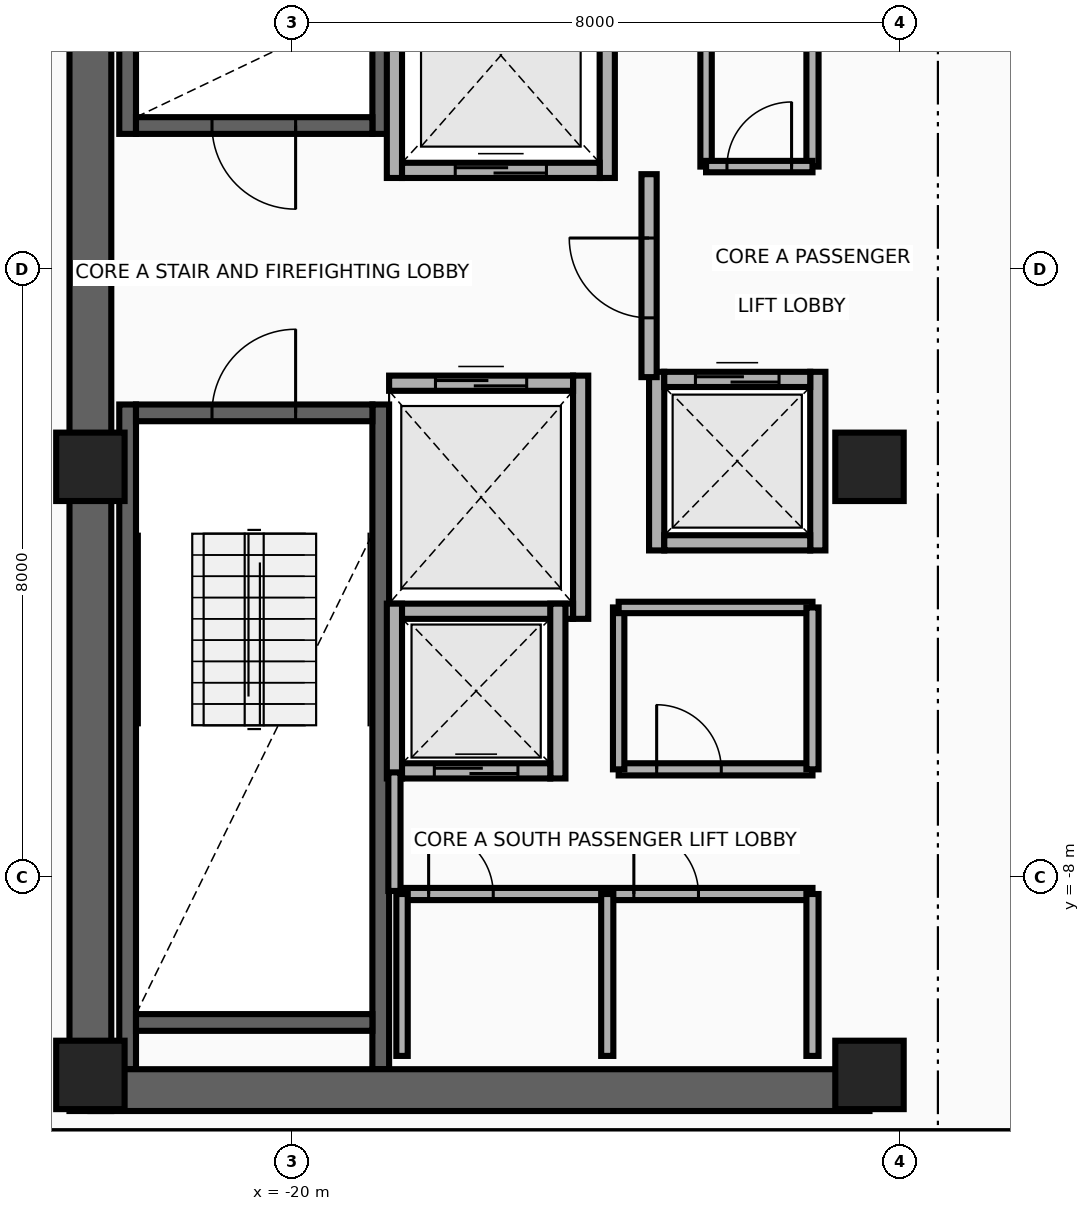
"""IFC4 building model, lengths in metres.
Left out: names, types, materials, properties, quantities, classifications, styles, units other than length and angle.
Written with IfcOpenShell. Run it as: python <this file> out.ifc"""

import sys

from ifc_helpers import new_model, si_unit, direction, frame, frame_2d, origin, origin_2d, place, context, subcontext, project, spatial, rectangle, extrude, source, transform, mapped, element, fill, save


model = new_model("IFC4")
c1 = context("Model", 3, precision=1e-05, world=origin(), true_north=direction((0.0, 1.0)))
c2 = subcontext(c1, "Body", "Model", "MODEL_VIEW")
j1 = project(units=[si_unit("LENGTHUNIT", "METRE"), si_unit("PLANEANGLEUNIT", "RADIAN")], contexts=[c1])
p1 = place(None, origin())
s1 = spatial("IfcSite", under=j1, at=p1, CompositionType="ELEMENT")
p2 = place(p1, origin())
s2 = spatial("IfcBuilding", under=s1, at=p2, CompositionType="ELEMENT")
p3 = place(p2, frame((0.0, 0.0, 237.0)))
s3 = spatial("IfcBuildingStorey", under=s2, at=p3, CompositionType="ELEMENT", Elevation=237.0)
for number, where, z_axis, x_axis in (
    (1, (-22.16, 1.78, 0.0), (0.0, 0.0, 1.0), (0.0, 1.0, 0.0)),
    (2, (-18.83, 1.78, 0.0), (0.0, 0.0, 1.0), (0.0, 1.0, 0.0)),
):
    element("IfcWall", number, at=place(p3, frame(where, z_axis=z_axis, x_axis=x_axis)), inside=s3, PredefinedType="SHEAR", context=c2, shape_type="SweptSolid", body=[
        extrude(rectangle(XDim=8.745, YDim=0.22, at=frame_2d((4.373, 0.0))), origin(), (0.0, 0.0, 1.0), 3.26),
    ])
p4 = place(p3, frame((-22.05, 1.89, 0.0), z_axis=(0.0, 0.0, 1.0), x_axis=(1.0, 0.0, 0.0)))
e3 = element("IfcWall", 3, at=p4, inside=s3, PredefinedType="SHEAR", context=c2, shape_type="SweptSolid", body=[
    extrude(rectangle(XDim=3.11, YDim=0.22, at=frame_2d((1.555, 0.0))), origin(), (0.0, 0.0, 1.0), 3.26),
])
p5 = place(p4, frame((1.0, 0.0, 0.0)))
e4 = element("IfcOpeningElement", 4, at=p5, cuts=e3, PredefinedType="OPENING", context=c2, shape_type="SweptSolid", body=[
    extrude(rectangle(XDim=1.1, YDim=2.15, at=frame_2d((0.55, 1.075))), frame((0.0, 0.125, 0.0), z_axis=(0.0, -1.0, 0.0), x_axis=(1.0, 0.0, 0.0)), (0.0, 0.0, 1.0), 0.25),
])
for number, where, z_axis, x_axis in (
    (5, (-22.16, -10.525, 0.0), (0.0, 0.0, 1.0), (0.0, 1.0, 0.0)),
    (6, (-18.83, -10.525, 0.0), (0.0, 0.0, 1.0), (0.0, 1.0, 0.0)),
):
    element("IfcWall", number, at=place(p3, frame(where, z_axis=z_axis, x_axis=x_axis)), inside=s3, PredefinedType="SHEAR", context=c2, shape_type="SweptSolid", body=[
        extrude(rectangle(XDim=8.745, YDim=0.22, at=frame_2d((4.373, 0.0))), origin(), (0.0, 0.0, 1.0), 3.26),
    ])
p6 = place(p3, frame((-22.05, -9.91, 0.0), z_axis=(0.0, 0.0, 1.0), x_axis=(1.0, 0.0, 0.0)))
e7 = element("IfcWall", 7, at=p6, inside=s3, PredefinedType="SHEAR", context=c2, shape_type="SweptSolid", body=[
    extrude(rectangle(XDim=3.11, YDim=0.22, at=frame_2d((1.555, 0.0))), origin(), (0.0, 0.0, 1.0), 3.26),
])
p7 = place(p3, frame((-22.05, -1.89, 0.0), z_axis=(0.0, 0.0, 1.0), x_axis=(1.0, 0.0, 0.0)))
e8 = element("IfcWall", 8, at=p7, inside=s3, PredefinedType="SHEAR", context=c2, shape_type="SweptSolid", body=[
    extrude(rectangle(XDim=3.11, YDim=0.22, at=frame_2d((1.555, 0.0))), origin(), (0.0, 0.0, 1.0), 3.26),
])
p8 = place(p7, frame((1.0, 0.0, 0.0)))
e9 = element("IfcOpeningElement", 9, at=p8, cuts=e8, PredefinedType="OPENING", context=c2, shape_type="SweptSolid", body=[
    extrude(rectangle(XDim=1.1, YDim=2.15, at=frame_2d((0.55, 1.075))), frame((0.0, 0.125, 0.0), z_axis=(0.0, -1.0, 0.0), x_axis=(1.0, 0.0, 0.0)), (0.0, 0.0, 1.0), 0.25),
])
p9 = place(p3, frame((-22.65, -11.075, 0.0), z_axis=(0.0, 0.0, 1.0), x_axis=(0.0, 1.0, 0.0)))
e10 = element("IfcWall", 10, at=p9, inside=s3, PredefinedType="SHEAR", context=c2, shape_type="SweptSolid", body=[
    extrude(rectangle(XDim=22.15, YDim=0.55, at=frame_2d((11.075, 0.0))), origin(), (0.0, 0.0, 1.0), 3.26),
])
p10 = place(p3, frame((-22.65, -10.8, 0.0), z_axis=(0.0, 0.0, 1.0), x_axis=(1.0, 0.0, 0.0)))
e11 = element("IfcWall", 11, at=p10, inside=s3, PredefinedType="SHEAR", context=c2, shape_type="SweptSolid", body=[
    extrude(rectangle(XDim=10.25, YDim=0.55, at=frame_2d((5.125, 0.0))), origin(), (0.0, 0.0, 1.0), 3.26),
])
m1 = source(origin(), c2, "Body", "SweptSolid", [
    extrude(rectangle(XDim=0.9, YDim=0.9, at=origin_2d()), origin(), (0.0, 0.0, 1.0), 3.5),
])
for number, where, z_axis, x_axis in (
    (12, (-22.65, -10.6, 0.0), (0.0, 0.0, 1.0), (1.0, 0.0, 0.0)),
    (13, (-12.4, -10.6, 0.0), (0.0, 0.0, 1.0), (1.0, 0.0, 0.0)),
    (14, (-22.65, -2.6, 0.0), (0.0, 0.0, 1.0), (1.0, 0.0, 0.0)),
    (15, (-12.4, -2.6, 0.0), (0.0, 0.0, 1.0), (1.0, 0.0, 0.0)),
):
    element("IfcColumn", number, at=place(p3, frame(where, z_axis=z_axis, x_axis=x_axis)), inside=s3, PredefinedType="COLUMN", context=c2, shape_type="MappedRepresentation", body=[
        mapped(m1, transform((0.0, 0.0, 0.0), x_axis=(1.0, 0.0, 0.0), y_axis=(0.0, 1.0, 0.0), z_axis=(0.0, 0.0, 1.0), scale=1.0)),
    ])
for number, where, z_axis, x_axis in (
    (16, (-18.65, 1.2, 0.0), (0.0, 0.0, 1.0), (0.0, 1.0, 0.0)),
    (17, (-15.85, 1.2, 0.0), (0.0, 0.0, 1.0), (0.0, 1.0, 0.0)),
):
    element("IfcWall", number, at=place(p3, frame(where, z_axis=z_axis, x_axis=x_axis)), inside=s3, PredefinedType="MOVABLE", context=c2, shape_type="SweptSolid", body=[
        extrude(rectangle(XDim=3.225, YDim=0.2, at=frame_2d((1.613, 0.0))), origin(), (0.0, 0.0, 1.0), 3.26),
    ])
p11 = place(p3, frame((-18.55, 1.3, 0.0), z_axis=(0.0, 0.0, 1.0), x_axis=(1.0, 0.0, 0.0)))
e18 = element("IfcWall", 18, at=p11, inside=s3, PredefinedType="MOVABLE", context=c2, shape_type="SweptSolid", body=[
    extrude(rectangle(XDim=2.6, YDim=0.2, at=frame_2d((1.3, 0.0))), origin(), (0.0, 0.0, 1.0), 3.26),
])
p12 = place(p11, frame((0.7, 0.0, 0.0)))
e19 = element("IfcOpeningElement", 19, at=p12, cuts=e18, PredefinedType="OPENING", context=c2, shape_type="SweptSolid", body=[
    extrude(rectangle(XDim=1.2, YDim=2.1, at=frame_2d((0.6, 1.05))), frame((0.0, 0.115, 0.0), z_axis=(0.0, -1.0, 0.0), x_axis=(1.0, 0.0, 0.0)), (0.0, 0.0, 1.0), 0.23),
])
p13 = place(p3, frame((-16.2, -4.6, 0.0), z_axis=(0.0, 0.0, 1.0), x_axis=(0.0, 1.0, 0.0)))
e20 = element("IfcWall", 20, at=p13, inside=s3, PredefinedType="MOVABLE", context=c2, shape_type="SweptSolid", body=[
    extrude(rectangle(XDim=3.2, YDim=0.2, at=frame_2d((1.6, 0.0))), origin(), (0.0, 0.0, 1.0), 3.26),
])
p14 = place(p3, frame((-18.72, -4.5, 0.0), z_axis=(0.0, 0.0, 1.0), x_axis=(1.0, 0.0, 0.0)))
e21 = element("IfcWall", 21, at=p14, inside=s3, PredefinedType="MOVABLE", context=c2, shape_type="SweptSolid", body=[
    extrude(rectangle(XDim=2.42, YDim=0.2, at=frame_2d((1.21, 0.0))), origin(), (0.0, 0.0, 1.0), 3.26),
])
p15 = place(p3, frame((-18.72, -1.5, 0.0), z_axis=(0.0, 0.0, 1.0), x_axis=(1.0, 0.0, 0.0)))
e22 = element("IfcWall", 22, at=p15, inside=s3, PredefinedType="MOVABLE", context=c2, shape_type="SweptSolid", body=[
    extrude(rectangle(XDim=2.42, YDim=0.2, at=frame_2d((1.21, 0.0))), origin(), (0.0, 0.0, 1.0), 3.26),
])
p16 = place(p15, frame((0.61, 0.0, 0.0)))
e23 = element("IfcOpeningElement", 23, at=p16, cuts=e22, PredefinedType="OPENING", context=c2, shape_type="SweptSolid", body=[
    extrude(rectangle(XDim=1.2, YDim=2.1, at=frame_2d((0.6, 1.05))), frame((0.0, 0.115, 0.0), z_axis=(0.0, -1.0, 0.0), x_axis=(1.0, 0.0, 0.0)), (0.0, 0.0, 1.0), 0.23),
])
for number, where, z_axis, x_axis in (
    (24, (-18.65, -6.7, 0.0), (0.0, 0.0, 1.0), (0.0, 1.0, 0.0)),
    (25, (-16.5, -6.7, 0.0), (0.0, 0.0, 1.0), (0.0, 1.0, 0.0)),
):
    element("IfcWall", number, at=place(p3, frame(where, z_axis=z_axis, x_axis=x_axis)), inside=s3, PredefinedType="MOVABLE", context=c2, shape_type="SweptSolid", body=[
        extrude(rectangle(XDim=2.3, YDim=0.2, at=frame_2d((1.15, 0.0))), origin(), (0.0, 0.0, 1.0), 3.26),
    ])
p17 = place(p3, frame((-18.55, -6.6, 0.0), z_axis=(0.0, 0.0, 1.0), x_axis=(1.0, 0.0, 0.0)))
e26 = element("IfcWall", 26, at=p17, inside=s3, PredefinedType="MOVABLE", context=c2, shape_type="SweptSolid", body=[
    extrude(rectangle(XDim=1.95, YDim=0.2, at=frame_2d((0.975, 0.0))), origin(), (0.0, 0.0, 1.0), 3.26),
])
p18 = place(p17, frame((0.425, 0.0, 0.0)))
e27 = element("IfcOpeningElement", 27, at=p18, cuts=e26, PredefinedType="OPENING", context=c2, shape_type="SweptSolid", body=[
    extrude(rectangle(XDim=1.1, YDim=2.1, at=frame_2d((0.55, 1.05))), frame((0.0, 0.115, 0.0), z_axis=(0.0, -1.0, 0.0), x_axis=(1.0, 0.0, 0.0)), (0.0, 0.0, 1.0), 0.23),
])
for number, where, z_axis, x_axis in (
    (28, (-15.2, -3.7, 0.0), (0.0, 0.0, 1.0), (0.0, 1.0, 0.0)),
    (29, (-13.08, -3.7, 0.0), (0.0, 0.0, 1.0), (0.0, 1.0, 0.0)),
):
    element("IfcWall", number, at=place(p3, frame(where, z_axis=z_axis, x_axis=x_axis)), inside=s3, PredefinedType="MOVABLE", context=c2, shape_type="SweptSolid", body=[
        extrude(rectangle(XDim=2.35, YDim=0.2, at=frame_2d((1.175, 0.0))), origin(), (0.0, 0.0, 1.0), 3.26),
    ])
p19 = place(p3, frame((-15.1, -3.6, 0.0), z_axis=(0.0, 0.0, 1.0), x_axis=(1.0, 0.0, 0.0)))
e30 = element("IfcWall", 30, at=p19, inside=s3, PredefinedType="MOVABLE", context=c2, shape_type="SweptSolid", body=[
    extrude(rectangle(XDim=1.92, YDim=0.2, at=frame_2d((0.96, 0.0))), origin(), (0.0, 0.0, 1.0), 3.26),
])
p20 = place(p3, frame((-15.1, -1.45, 0.0), z_axis=(0.0, 0.0, 1.0), x_axis=(1.0, 0.0, 0.0)))
e31 = element("IfcWall", 31, at=p20, inside=s3, PredefinedType="MOVABLE", context=c2, shape_type="SweptSolid", body=[
    extrude(rectangle(XDim=1.92, YDim=0.2, at=frame_2d((0.96, 0.0))), origin(), (0.0, 0.0, 1.0), 3.26),
])
p21 = place(p20, frame((0.41, 0.0, 0.0)))
e32 = element("IfcOpeningElement", 32, at=p21, cuts=e31, PredefinedType="OPENING", context=c2, shape_type="SweptSolid", body=[
    extrude(rectangle(XDim=1.1, YDim=2.1, at=frame_2d((0.55, 1.05))), frame((0.0, 0.115, 0.0), z_axis=(0.0, -1.0, 0.0), x_axis=(1.0, 0.0, 0.0)), (0.0, 0.0, 1.0), 0.23),
])
p22 = place(p3, frame((-15.3, -1.42, 0.0), z_axis=(0.0, 0.0, 1.0), x_axis=(0.0, 1.0, 0.0)))
e33 = element("IfcWall", 33, at=p22, inside=s3, PredefinedType="PARTITIONING", context=c2, shape_type="SweptSolid", body=[
    extrude(rectangle(XDim=2.67, YDim=0.2, at=frame_2d((1.335, 0.0))), origin(), (0.0, 0.0, 1.0), 3.26),
])
p23 = place(p22, frame((0.78, 0.0, 0.0)))
e34 = element("IfcOpeningElement", 34, at=p23, cuts=e33, PredefinedType="OPENING", context=c2, shape_type="SweptSolid", body=[
    extrude(rectangle(XDim=1.05, YDim=2.15, at=frame_2d((0.525, 1.075))), frame((0.0, 0.115, 0.0), z_axis=(0.0, -1.0, 0.0), x_axis=(1.0, 0.0, 0.0)), (0.0, 0.0, 1.0), 0.23),
])
p24 = place(p3, frame((-18.65, -8.18, 0.0), z_axis=(0.0, 0.0, 1.0), x_axis=(0.0, 1.0, 0.0)))
e35 = element("IfcWall", 35, at=p24, inside=s3, PredefinedType="PARTITIONING", context=c2, shape_type="SweptSolid", body=[
    extrude(rectangle(XDim=1.56, YDim=0.16, at=frame_2d((0.78, 0.0))), origin(), (0.0, 0.0, 1.0), 3.26),
])
p25 = place(p3, frame((-18.55, -8.22, 0.0), z_axis=(0.0, 0.0, 1.0), x_axis=(1.0, 0.0, 0.0)))
e36 = element("IfcWall", 36, at=p25, inside=s3, PredefinedType="PARTITIONING", context=c2, shape_type="SweptSolid", body=[
    extrude(rectangle(XDim=5.4, YDim=0.16, at=frame_2d((2.7, 0.0))), origin(), (0.0, 0.0, 1.0), 3.26),
])
p26 = place(p25, frame((0.35, 0.0, 0.0)))
e37 = element("IfcOpeningElement", 37, at=p26, cuts=e36, PredefinedType="OPENING", context=c2, shape_type="SweptSolid", body=[
    extrude(rectangle(XDim=0.85, YDim=2.05, at=frame_2d((0.425, 1.025))), frame((0.0, 0.095, 0.0), z_axis=(0.0, -1.0, 0.0), x_axis=(1.0, 0.0, 0.0)), (0.0, 0.0, 1.0), 0.19),
])
p27 = place(p25, frame((3.05, 0.0, 0.0)))
e38 = element("IfcOpeningElement", 38, at=p27, cuts=e36, PredefinedType="OPENING", context=c2, shape_type="SweptSolid", body=[
    extrude(rectangle(XDim=0.85, YDim=2.05, at=frame_2d((0.425, 1.025))), frame((0.0, 0.095, 0.0), z_axis=(0.0, -1.0, 0.0), x_axis=(1.0, 0.0, 0.0)), (0.0, 0.0, 1.0), 0.19),
])
p28 = place(p3, frame((-18.55, -10.35, 0.0), z_axis=(0.0, 0.0, 1.0), x_axis=(0.0, 1.0, 0.0)))
e39 = element("IfcWall", 39, at=p28, inside=s3, PredefinedType="PARTITIONING", context=c2, shape_type="SweptSolid", body=[
    extrude(rectangle(XDim=2.13, YDim=0.15, at=frame_2d((1.065, 0.0))), origin(), (0.0, 0.0, 1.0), 3.26),
])
for number, where, z_axis, x_axis in (
    (40, (-13.15, -10.35, 0.0), (0.0, 0.0, 1.0), (0.0, 1.0, 0.0)),
    (41, (-15.85, -10.35, 0.0), (0.0, 0.0, 1.0), (0.0, 1.0, 0.0)),
):
    element("IfcWall", number, at=place(p3, frame(where, z_axis=z_axis, x_axis=x_axis)), inside=s3, PredefinedType="PARTITIONING", context=c2, shape_type="SweptSolid", body=[
        extrude(rectangle(XDim=2.13, YDim=0.16, at=frame_2d((1.065, 0.0))), origin(), (0.0, 0.0, 1.0), 3.26),
    ])
p29 = place(p3, frame((-15.7, -6.58, 0.0), z_axis=(0.0, 0.0, 1.0), x_axis=(1.0, 0.0, 0.0)))
e42 = element("IfcWall", 42, at=p29, inside=s3, PredefinedType="PARTITIONING", context=c2, shape_type="SweptSolid", body=[
    extrude(rectangle(XDim=2.55, YDim=0.16, at=frame_2d((1.275, 0.0))), origin(), (0.0, 0.0, 1.0), 3.26),
])
p30 = place(p29, frame((0.5, 0.0, 0.0)))
e43 = element("IfcOpeningElement", 43, at=p30, cuts=e42, PredefinedType="OPENING", context=c2, shape_type="SweptSolid", body=[
    extrude(rectangle(XDim=0.85, YDim=2.05, at=frame_2d((0.425, 1.025))), frame((0.0, 0.095, 0.0), z_axis=(0.0, -1.0, 0.0), x_axis=(1.0, 0.0, 0.0)), (0.0, 0.0, 1.0), 0.19),
])
p31 = place(p3, frame((-15.7, -6.58, 0.0), z_axis=(0.0, 0.0, 1.0), x_axis=(0.0, 1.0, 0.0)))
e44 = element("IfcWall", 44, at=p31, inside=s3, PredefinedType="PARTITIONING", context=c2, shape_type="SweptSolid", body=[
    extrude(rectangle(XDim=2.13, YDim=0.15, at=frame_2d((1.065, 0.0))), origin(), (0.0, 0.0, 1.0), 3.26),
])
p32 = place(p3, frame((-15.7, -4.45, 0.0), z_axis=(0.0, 0.0, 1.0), x_axis=(1.0, 0.0, 0.0)))
e45 = element("IfcWall", 45, at=p32, inside=s3, PredefinedType="PARTITIONING", context=c2, shape_type="SweptSolid", body=[
    extrude(rectangle(XDim=2.55, YDim=0.15, at=frame_2d((1.275, 0.0))), origin(), (0.0, 0.0, 1.0), 3.26),
])
p33 = place(p3, frame((-13.15, -6.58, 0.0), z_axis=(0.0, 0.0, 1.0), x_axis=(0.0, 1.0, 0.0)))
e46 = element("IfcWall", 46, at=p33, inside=s3, PredefinedType="PARTITIONING", context=c2, shape_type="SweptSolid", body=[
    extrude(rectangle(XDim=2.13, YDim=0.16, at=frame_2d((1.065, 0.0))), origin(), (0.0, 0.0, 1.0), 3.26),
])
p34 = place(p3, frame((-13.15, 1.35, 0.0), z_axis=(0.0, 0.0, 1.0), x_axis=(0.0, 1.0, 0.0)))
e47 = element("IfcWall", 47, at=p34, inside=s3, PredefinedType="PARTITIONING", context=c2, shape_type="SweptSolid", body=[
    extrude(rectangle(XDim=1.95, YDim=0.16, at=frame_2d((0.975, 0.0))), origin(), (0.0, 0.0, 1.0), 3.26),
])
p35 = place(p3, frame((-14.55, 1.35, 0.0), z_axis=(0.0, 0.0, 1.0), x_axis=(0.0, 1.0, 0.0)))
e48 = element("IfcWall", 48, at=p35, inside=s3, PredefinedType="PARTITIONING", context=c2, shape_type="SweptSolid", body=[
    extrude(rectangle(XDim=1.95, YDim=0.15, at=frame_2d((0.975, 0.0))), origin(), (0.0, 0.0, 1.0), 3.26),
])
p36 = place(p3, frame((-14.55, 1.35, 0.0), z_axis=(0.0, 0.0, 1.0), x_axis=(1.0, 0.0, 0.0)))
e49 = element("IfcWall", 49, at=p36, inside=s3, PredefinedType="PARTITIONING", context=c2, shape_type="SweptSolid", body=[
    extrude(rectangle(XDim=1.4, YDim=0.15, at=frame_2d((0.7, 0.0))), origin(), (0.0, 0.0, 1.0), 3.26),
])
p37 = place(p36, frame((0.275, 0.0, 0.0)))
e50 = element("IfcOpeningElement", 50, at=p37, cuts=e49, PredefinedType="OPENING", context=c2, shape_type="SweptSolid", body=[
    extrude(rectangle(XDim=0.85, YDim=2.05, at=frame_2d((0.425, 1.025))), frame((0.0, 0.09, 0.0), z_axis=(0.0, -1.0, 0.0), x_axis=(1.0, 0.0, 0.0)), (0.0, 0.0, 1.0), 0.18),
])
p38 = place(p3, frame((-23.45, -11.42, 0.0), z_axis=(0.0, 0.0, 1.0), x_axis=(1.0, 0.0, 0.0)))
e51 = element("IfcWall", 51, at=p38, inside=s3, PredefinedType="PARTITIONING", context=c2, shape_type="SweptSolid", body=[
    extrude(rectangle(XDim=13.84, YDim=0.16, at=frame_2d((6.92, 0.0))), origin(), (0.0, 0.0, 1.0), 2.634),
])
p39 = place(p12, origin())
e52 = element("IfcDoor", 52, at=p39, inside=s3, OperationType="DOUBLE_DOOR_SLIDING", PredefinedType="DOOR", context=c2, shape_type="SweptSolid", body=[
    extrude(rectangle(XDim=1.2, YDim=2.1, at=frame_2d((0.6, 1.05))), frame((0.0, 0.025, 0.0), z_axis=(0.0, -1.0, 0.0), x_axis=(1.0, 0.0, 0.0)), (0.0, 0.0, 1.0), 0.05),
])
fill(e19, e52)
p40 = place(p16, origin())
e53 = element("IfcDoor", 53, at=p40, inside=s3, OperationType="DOUBLE_DOOR_SLIDING", PredefinedType="DOOR", context=c2, shape_type="SweptSolid", body=[
    extrude(rectangle(XDim=1.2, YDim=2.1, at=frame_2d((0.6, 1.05))), frame((0.0, 0.025, 0.0), z_axis=(0.0, -1.0, 0.0), x_axis=(1.0, 0.0, 0.0)), (0.0, 0.0, 1.0), 0.05),
])
fill(e23, e53)
p41 = place(p18, origin())
e54 = element("IfcDoor", 54, at=p41, inside=s3, OperationType="DOUBLE_DOOR_SLIDING", PredefinedType="DOOR", context=c2, shape_type="SweptSolid", body=[
    extrude(rectangle(XDim=1.1, YDim=2.1, at=frame_2d((0.55, 1.05))), frame((0.0, 0.025, 0.0), z_axis=(0.0, -1.0, 0.0), x_axis=(1.0, 0.0, 0.0)), (0.0, 0.0, 1.0), 0.05),
])
fill(e27, e54)
p42 = place(p21, origin())
e55 = element("IfcDoor", 55, at=p42, inside=s3, OperationType="DOUBLE_DOOR_SLIDING", PredefinedType="DOOR", context=c2, shape_type="SweptSolid", body=[
    extrude(rectangle(XDim=1.1, YDim=2.1, at=frame_2d((0.55, 1.05))), frame((0.0, 0.025, 0.0), z_axis=(0.0, -1.0, 0.0), x_axis=(1.0, 0.0, 0.0)), (0.0, 0.0, 1.0), 0.05),
])
fill(e32, e55)
p43 = place(p23, origin())
e56 = element("IfcDoor", 56, at=p43, inside=s3, OperationType="SINGLE_SWING_RIGHT", PredefinedType="DOOR", context=c2, shape_type="SweptSolid", body=[
    extrude(rectangle(XDim=1.05, YDim=2.15, at=frame_2d((0.525, 1.075))), frame((0.0, 0.025, 0.0), z_axis=(0.0, -1.0, 0.0), x_axis=(1.0, 0.0, 0.0)), (0.0, 0.0, 1.0), 0.05),
])
fill(e34, e56)
p44 = place(p5, frame((1.1, 0.0, 0.0), z_axis=(0.0, 0.0, 1.0), x_axis=(-1.0, 0.0, 0.0)))
e57 = element("IfcDoor", 57, at=p44, inside=s3, OperationType="SINGLE_SWING_LEFT", PredefinedType="DOOR", context=c2, shape_type="SweptSolid", body=[
    extrude(rectangle(XDim=1.1, YDim=2.15, at=frame_2d((0.55, 1.075))), frame((0.0, 0.025, 0.0), z_axis=(0.0, -1.0, 0.0), x_axis=(1.0, 0.0, 0.0)), (0.0, 0.0, 1.0), 0.05),
])
fill(e4, e57)
p45 = place(p8, origin())
e58 = element("IfcDoor", 58, at=p45, inside=s3, OperationType="SINGLE_SWING_RIGHT", PredefinedType="DOOR", context=c2, shape_type="SweptSolid", body=[
    extrude(rectangle(XDim=1.1, YDim=2.15, at=frame_2d((0.55, 1.075))), frame((0.0, 0.025, 0.0), z_axis=(0.0, -1.0, 0.0), x_axis=(1.0, 0.0, 0.0)), (0.0, 0.0, 1.0), 0.05),
])
fill(e9, e58)
p46 = place(p26, origin())
e59 = element("IfcDoor", 59, at=p46, inside=s3, OperationType="SINGLE_SWING_RIGHT", PredefinedType="DOOR", context=c2, shape_type="SweptSolid", body=[
    extrude(rectangle(XDim=0.85, YDim=2.05, at=frame_2d((0.425, 1.025))), frame((0.0, 0.025, 0.0), z_axis=(0.0, -1.0, 0.0), x_axis=(1.0, 0.0, 0.0)), (0.0, 0.0, 1.0), 0.05),
])
fill(e37, e59)
p47 = place(p27, origin())
e60 = element("IfcDoor", 60, at=p47, inside=s3, OperationType="SINGLE_SWING_LEFT", PredefinedType="DOOR", context=c2, shape_type="SweptSolid", body=[
    extrude(rectangle(XDim=0.85, YDim=2.05, at=frame_2d((0.425, 1.025))), frame((0.0, 0.025, 0.0), z_axis=(0.0, -1.0, 0.0), x_axis=(1.0, 0.0, 0.0)), (0.0, 0.0, 1.0), 0.05),
])
fill(e38, e60)
p48 = place(p30, origin())
e61 = element("IfcDoor", 61, at=p48, inside=s3, OperationType="SINGLE_SWING_RIGHT", PredefinedType="DOOR", context=c2, shape_type="SweptSolid", body=[
    extrude(rectangle(XDim=0.85, YDim=2.05, at=frame_2d((0.425, 1.025))), frame((0.0, 0.025, 0.0), z_axis=(0.0, -1.0, 0.0), x_axis=(1.0, 0.0, 0.0)), (0.0, 0.0, 1.0), 0.05),
])
fill(e43, e61)
p49 = place(p37, origin())
e62 = element("IfcDoor", 62, at=p49, inside=s3, OperationType="SINGLE_SWING_LEFT", PredefinedType="DOOR", context=c2, shape_type="SweptSolid", body=[
    extrude(rectangle(XDim=0.85, YDim=2.05, at=frame_2d((0.425, 1.025))), frame((0.0, 0.025, 0.0), z_axis=(0.0, -1.0, 0.0), x_axis=(1.0, 0.0, 0.0)), (0.0, 0.0, 1.0), 0.05),
])
fill(e50, e62)
save(model, sys.argv[1])
